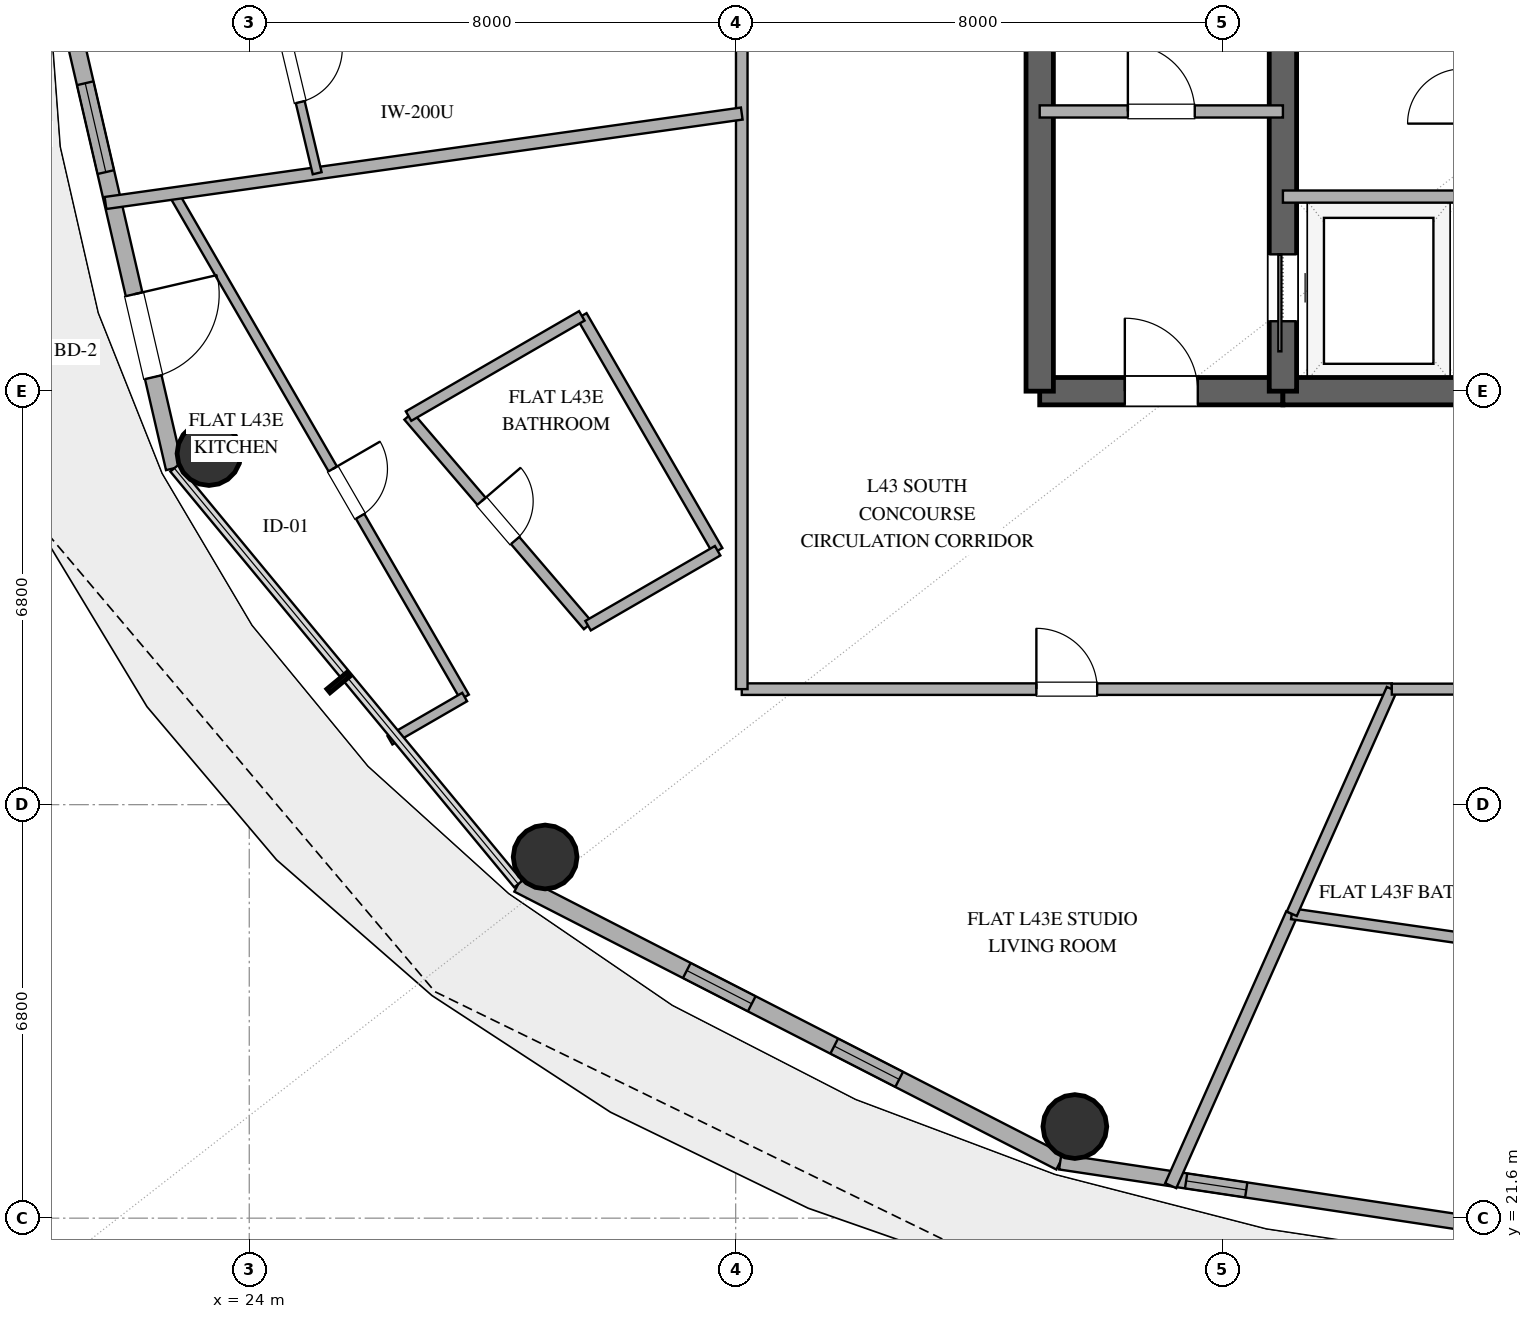
"""IFC4 building model, lengths in metres.
Left out: names, types, materials, properties, quantities, classifications, styles, units other than length and angle.
Written with IfcOpenShell. Run it as: python <this file> out.ifc"""

import sys

from ifc_helpers import new_model, si_unit, direction, frame, frame_2d, origin, origin_2d, place, context, subcontext, project, spatial, rectangle, hollow_circle, extrude, element, fill, save


model = new_model("IFC4")
c1 = context("Model", 3, precision=1e-05, world=origin(), true_north=direction((0.0, 1.0)))
c2 = subcontext(c1, "Body", "Model", "MODEL_VIEW")
j1 = project(units=[si_unit("LENGTHUNIT", "METRE"), si_unit("PLANEANGLEUNIT", "RADIAN")], contexts=[c1])
p1 = place(None, origin())
s1 = spatial("IfcSite", under=j1, at=p1, CompositionType="ELEMENT")
p2 = place(p1, origin())
s2 = spatial("IfcBuilding", under=s1, at=p2, CompositionType="ELEMENT")
p3 = place(p2, frame((0.0, 0.0, 172.2)))
s3 = spatial("IfcBuildingStorey", under=s2, at=p3, CompositionType="ELEMENT", Elevation=172.2)
p4 = place(p3, frame((37.0, 35.2, 0.0), z_axis=(0.0, 0.0, 1.0), x_axis=(1.0, 0.0, 0.0)))
e1 = element("IfcWall", 1, at=p4, inside=s3, PredefinedType="SHEAR", context=c2, shape_type="SweptSolid", body=[
    extrude(rectangle(XDim=4.0, YDim=0.45, at=frame_2d((2.0, 0.0))), origin(), (0.0, 0.0, 1.0), 3.38),
])
p5 = place(p4, frame((1.4, 0.0, 0.0)))
e2 = element("IfcOpeningElement", 2, at=p5, cuts=e1, PredefinedType="OPENING", context=c2, shape_type="SweptSolid", body=[
    extrude(rectangle(XDim=1.2, YDim=2.15, at=frame_2d((0.6, 1.075))), frame((0.0, 0.235, 0.0), z_axis=(0.0, -1.0, 0.0), x_axis=(1.0, 0.0, 0.0)), (0.0, 0.0, 1.0), 0.47),
])
p6 = place(p3, frame((41.0, 35.2, 0.0), z_axis=(0.0, 0.0, 1.0), x_axis=(1.0, 0.0, 0.0)))
e3 = element("IfcWall", 3, at=p6, inside=s3, PredefinedType="SHEAR", context=c2, shape_type="SweptSolid", body=[
    extrude(rectangle(XDim=14.0, YDim=0.45, at=frame_2d((7.0, 0.0))), origin(), (0.0, 0.0, 1.0), 3.38),
])
p7 = place(p6, frame((6.1, 0.0, 0.0)))
e4 = element("IfcOpeningElement", 4, at=p7, cuts=e3, PredefinedType="OPENING", context=c2, shape_type="SweptSolid", body=[
    extrude(rectangle(XDim=1.8, YDim=2.25, at=frame_2d((0.9, 1.125))), frame((0.0, 0.235, 0.0), z_axis=(0.0, -1.0, 0.0), x_axis=(1.0, 0.0, 0.0)), (0.0, 0.0, 1.0), 0.47),
])
p8 = place(p3, frame((37.0, 35.2, 0.0), z_axis=(0.0, 0.0, 1.0), x_axis=(0.0, 1.0, 0.0)))
e5 = element("IfcWall", 5, at=p8, inside=s3, PredefinedType="SHEAR", context=c2, shape_type="SweptSolid", body=[
    extrude(rectangle(XDim=13.6, YDim=0.45, at=frame_2d((6.8, 0.0))), origin(), (0.0, 0.0, 1.0), 3.38),
])
p9 = place(p3, frame((41.0, 35.2, 0.0), z_axis=(0.0, 0.0, 1.0), x_axis=(0.0, 1.0, 0.0)))
e6 = element("IfcWall", 6, at=p9, inside=s3, PredefinedType="SHEAR", context=c2, shape_type="SweptSolid", body=[
    extrude(rectangle(XDim=13.6, YDim=0.45, at=frame_2d((6.8, 0.0))), origin(), (0.0, 0.0, 1.0), 3.38),
])
p10 = place(p9, frame((1.15, 0.0, 0.0)))
e7 = element("IfcOpeningElement", 7, at=p10, cuts=e6, PredefinedType="OPENING", context=c2, shape_type="SweptSolid", body=[
    extrude(rectangle(XDim=1.1, YDim=2.2, at=frame_2d((0.55, 1.1))), frame((0.0, 0.235, 0.0), z_axis=(0.0, -1.0, 0.0), x_axis=(1.0, 0.0, 0.0)), (0.0, 0.0, 1.0), 0.47),
])
for number, where, z_axis, x_axis in (
    (8, (23.338, 34.174, 0.0), (0.0, 0.0, 1.0), (1.0, 0.0, 0.0)),
    (9, (28.866, 27.54, 0.0), (0.0, 0.0, 1.0), (1.0, 0.0, 0.0)),
    (10, (37.578, 23.107, 0.0), (0.0, 0.0, 1.0), (1.0, 0.0, 0.0)),
):
    element("IfcColumn", number, at=place(p3, frame(where, z_axis=z_axis, x_axis=x_axis)), inside=s3, PredefinedType="COLUMN", context=c2, shape_type="SweptSolid", body=[
        extrude(hollow_circle(Radius=0.525, WallThickness=0.028, at=origin_2d()), origin(), (0.0, 0.0, 1.0), 3.38),
    ])
p11 = place(p3, frame((20.901, 42.0, 0.0), z_axis=(0.0, 0.0, 1.0), x_axis=(0.225473184558, -0.974249374157, 0.0)))
e11 = element("IfcWall", 11, at=p11, inside=s3, PredefinedType="SOLIDWALL", context=c2, shape_type="SweptSolid", body=[
    extrude(rectangle(XDim=8.28, YDim=0.28, at=frame_2d((4.14, 0.0))), origin(), (0.0, 0.0, 1.0), 3.38),
])
p12 = place(p11, frame((1.782, 0.0, 0.85)))
e12 = element("IfcOpeningElement", 12, at=p12, cuts=e11, PredefinedType="OPENING", context=c2, shape_type="SweptSolid", body=[
    extrude(rectangle(XDim=1.5, YDim=1.8, at=frame_2d((0.75, 0.9))), frame((0.0, 0.15, 0.0), z_axis=(0.0, -1.0, 0.0), x_axis=(1.0, 0.0, 0.0)), (0.0, 0.0, 1.0), 0.3),
])
p13 = place(p11, frame((5.344, 0.0, 0.0)))
e13 = element("IfcOpeningElement", 13, at=p13, cuts=e11, PredefinedType="OPENING", context=c2, shape_type="SweptSolid", body=[
    extrude(rectangle(XDim=1.4, YDim=2.2, at=frame_2d((0.7, 1.1))), frame((0.0, 0.15, 0.0), z_axis=(0.0, -1.0, 0.0), x_axis=(1.0, 0.0, 0.0)), (0.0, 0.0, 1.0), 0.3),
])
p14 = place(p3, frame((28.424, 27.094, 0.0), z_axis=(0.0, 0.0, 1.0), x_axis=(0.889872523182, -0.456209263919, 0.0)))
e14 = element("IfcWall", 14, at=p14, inside=s3, PredefinedType="SOLIDWALL", context=c2, shape_type="SweptSolid", body=[
    extrude(rectangle(XDim=10.016, YDim=0.28, at=frame_2d((5.008, 0.0))), origin(), (0.0, 0.0, 1.0), 3.38),
])
p15 = place(p14, frame((3.115, 0.0, 0.85)))
e15 = element("IfcOpeningElement", 15, at=p15, cuts=e14, PredefinedType="OPENING", context=c2, shape_type="SweptSolid", body=[
    extrude(rectangle(XDim=1.2, YDim=1.8, at=frame_2d((0.6, 0.9))), frame((0.0, 0.15, 0.0), z_axis=(0.0, -1.0, 0.0), x_axis=(1.0, 0.0, 0.0)), (0.0, 0.0, 1.0), 0.3),
])
p16 = place(p14, frame((5.84, 0.0, 0.85)))
e16 = element("IfcOpeningElement", 16, at=p16, cuts=e14, PredefinedType="OPENING", context=c2, shape_type="SweptSolid", body=[
    extrude(rectangle(XDim=1.2, YDim=1.8, at=frame_2d((0.6, 0.9))), frame((0.0, 0.15, 0.0), z_axis=(0.0, -1.0, 0.0), x_axis=(1.0, 0.0, 0.0)), (0.0, 0.0, 1.0), 0.3),
])
p17 = place(p3, frame((37.337, 22.525, 0.0), z_axis=(0.0, 0.0, 1.0), x_axis=(0.988863993413, -0.148822049884, 0.0)))
e17 = element("IfcWall", 17, at=p17, inside=s3, PredefinedType="SOLIDWALL", context=c2, shape_type="SweptSolid", body=[
    extrude(rectangle(XDim=10.783, YDim=0.25, at=frame_2d((5.392, 0.0))), origin(), (0.0, 0.0, 1.0), 3.38),
])
p18 = place(p17, frame((2.094, 0.0, 0.35)))
e18 = element("IfcOpeningElement", 18, at=p18, cuts=e17, PredefinedType="OPENING", context=c2, shape_type="SweptSolid", body=[
    extrude(rectangle(XDim=1.0, YDim=1.05, at=frame_2d((0.5, 0.525))), frame((0.0, 0.135, 0.0), z_axis=(0.0, -1.0, 0.0), x_axis=(1.0, 0.0, 0.0)), (0.0, 0.0, 1.0), 0.27),
])
p19 = place(p3, frame((37.0, 39.8, 0.0), z_axis=(0.0, 0.0, 1.0), x_axis=(1.0, 0.0, 0.0)))
e19 = element("IfcWall", 19, at=p19, inside=s3, PredefinedType="SOLIDWALL", context=c2, shape_type="SweptSolid", body=[
    extrude(rectangle(XDim=4.0, YDim=0.2, at=frame_2d((2.0, 0.0))), origin(), (0.0, 0.0, 1.0), 2.74),
])
p20 = place(p19, frame((1.45, 0.0, 0.0)))
e20 = element("IfcOpeningElement", 20, at=p20, cuts=e19, PredefinedType="OPENING", context=c2, shape_type="SweptSolid", body=[
    extrude(rectangle(XDim=1.1, YDim=2.15, at=frame_2d((0.55, 1.075))), frame((0.0, 0.11, 0.0), z_axis=(0.0, -1.0, 0.0), x_axis=(1.0, 0.0, 0.0)), (0.0, 0.0, 1.0), 0.22),
])
p21 = place(p3, frame((41.0, 38.4, 0.0), z_axis=(0.0, 0.0, 1.0), x_axis=(1.0, 0.0, 0.0)))
e21 = element("IfcWall", 21, at=p21, inside=s3, PredefinedType="SOLIDWALL", context=c2, shape_type="SweptSolid", body=[
    extrude(rectangle(XDim=2.95, YDim=0.2, at=frame_2d((1.475, 0.0))), origin(), (0.0, 0.0, 1.0), 2.74),
])
p22 = place(p3, frame((32.1, 30.3, 0.0), z_axis=(0.0, 0.0, 1.0), x_axis=(1.0, 0.0, 0.0)))
e22 = element("IfcWall", 22, at=p22, inside=s3, PredefinedType="PARTITIONING", context=c2, shape_type="SweptSolid", body=[
    extrude(rectangle(XDim=10.691, YDim=0.19, at=frame_2d((5.345, 0.0))), origin(), (0.0, 0.0, 1.0), 2.74),
])
p23 = place(p22, frame((4.845, 0.0, 0.0)))
e23 = element("IfcOpeningElement", 23, at=p23, cuts=e22, PredefinedType="OPENING", context=c2, shape_type="SweptSolid", body=[
    extrude(rectangle(XDim=1.0, YDim=2.2, at=frame_2d((0.5, 1.1))), frame((0.0, 0.105, 0.0), z_axis=(0.0, -1.0, 0.0), x_axis=(1.0, 0.0, 0.0)), (0.0, 0.0, 1.0), 0.21),
])
p24 = place(p3, frame((22.753, 38.452, 0.0), z_axis=(0.0, 0.0, 1.0), x_axis=(0.500584533727, -0.865687659952, 0.0)))
e24 = element("IfcWall", 24, at=p24, inside=s3, PredefinedType="PLUMBINGWALL", context=c2, shape_type="SweptSolid", body=[
    extrude(rectangle(XDim=9.567, YDim=0.16, at=frame_2d((4.783, 0.0))), origin(), (0.0, 0.0, 1.0), 2.74),
])
p25 = place(p24, frame((5.233, 0.0, 0.0)))
e25 = element("IfcOpeningElement", 25, at=p25, cuts=e24, PredefinedType="OPENING", context=c2, shape_type="SweptSolid", body=[
    extrude(rectangle(XDim=0.9, YDim=2.1, at=frame_2d((0.45, 1.05))), frame((0.0, 0.09, 0.0), z_axis=(0.0, -1.0, 0.0), x_axis=(1.0, 0.0, 0.0)), (0.0, 0.0, 1.0), 0.18),
])
p26 = place(p3, frame((32.1, 46.593, 0.0), z_axis=(0.0, 0.0, 1.0), x_axis=(0.0, -1.0, 0.0)))
e26 = element("IfcWall", 26, at=p26, inside=s3, PredefinedType="PARTITIONING", context=c2, shape_type="SweptSolid", body=[
    extrude(rectangle(XDim=16.292, YDim=0.19, at=frame_2d((8.146, 0.0))), origin(), (0.0, 0.0, 1.0), 2.74),
])
p27 = place(p3, frame((21.635, 38.295, 0.0), z_axis=(0.0, 0.0, 1.0), x_axis=(0.990268074466, 0.139173060229, 0.0)))
e27 = element("IfcWall", 27, at=p27, inside=s3, PredefinedType="PARTITIONING", context=c2, shape_type="SweptSolid", body=[
    extrude(rectangle(XDim=10.567, YDim=0.2, at=frame_2d((5.284, 0.0))), origin(), (0.0, 0.0, 1.0), 2.74),
])
p28 = place(p3, frame((39.155, 22.134, 0.0), z_axis=(0.0, 0.0, 1.0), x_axis=(0.406740050792, 0.913543940422, 0.0)))
e28 = element("IfcWall", 28, at=p28, inside=s3, PredefinedType="PARTITIONING", context=c2, shape_type="SweptSolid", body=[
    extrude(rectangle(XDim=4.894, YDim=0.2, at=frame_2d((2.447, 0.0))), origin(), (0.0, 0.0, 1.0), 2.74),
])
p29 = place(p3, frame((26.62, 34.79, 0.0), z_axis=(0.0, 0.0, 1.0), x_axis=(0.650507788654, -0.759499583213, 0.0)))
e29 = element("IfcWall", 29, at=p29, inside=s3, PredefinedType="PLUMBINGWALL", context=c2, shape_type="SweptSolid", body=[
    extrude(rectangle(XDim=4.538, YDim=0.18, at=frame_2d((2.269, 0.0))), origin(), (0.0, 0.0, 1.0), 2.74),
])
p30 = place(p29, frame((1.844, 0.0, 0.0)))
e30 = element("IfcOpeningElement", 30, at=p30, cuts=e29, PredefinedType="OPENING", context=c2, shape_type="SweptSolid", body=[
    extrude(rectangle(XDim=0.85, YDim=2.1, at=frame_2d((0.425, 1.05))), frame((0.0, 0.1, 0.0), z_axis=(0.0, -1.0, 0.0), x_axis=(1.0, 0.0, 0.0)), (0.0, 0.0, 1.0), 0.2),
])
p31 = place(p3, frame((31.703, 32.576, 0.0), z_axis=(0.0, 0.0, 1.0), x_axis=(-0.500604830324, 0.865675923112, 0.0)))
e31 = element("IfcWall", 31, at=p31, inside=s3, PredefinedType="PLUMBINGWALL", context=c2, shape_type="SweptSolid", body=[
    extrude(rectangle(XDim=4.462, YDim=0.18, at=frame_2d((2.231, 0.0))), origin(), (0.0, 0.0, 1.0), 2.74),
])
p32 = place(p3, frame((45.366, 25.999, 0.0), z_axis=(0.0, 0.0, 1.0), x_axis=(-0.98982427769, 0.14229511339, 0.0)))
e32 = element("IfcWall", 32, at=p32, inside=s3, PredefinedType="PLUMBINGWALL", context=c2, shape_type="SweptSolid", body=[
    extrude(rectangle(XDim=4.264, YDim=0.18, at=frame_2d((2.132, 0.0))), origin(), (0.0, 0.0, 1.0), 2.74),
])
p33 = place(p3, frame((41.146, 26.605, 0.0), z_axis=(0.0, 0.0, 1.0), x_axis=(0.406732062562, 0.913547497005, 0.0)))
e33 = element("IfcWall", 33, at=p33, inside=s3, PredefinedType="PLUMBINGWALL", context=c2, shape_type="SweptSolid", body=[
    extrude(rectangle(XDim=4.044, YDim=0.18, at=frame_2d((2.022, 0.0))), origin(), (0.0, 0.0, 1.0), 2.74),
])
p34 = place(p3, frame((24.351, 42.0, 0.0), z_axis=(0.0, 0.0, 1.0), x_axis=(0.231590575549, -0.972813345569, 0.0)))
e34 = element("IfcWall", 34, at=p34, inside=s3, PredefinedType="PARTITIONING", context=c2, shape_type="SweptSolid", body=[
    extrude(rectangle(XDim=3.306, YDim=0.15, at=frame_2d((1.653, 0.0))), origin(), (0.0, 0.0, 1.0), 2.74),
])
p35 = place(p34, frame((1.203, 0.0, 0.0)))
e35 = element("IfcOpeningElement", 35, at=p35, cuts=e34, PredefinedType="OPENING", context=c2, shape_type="SweptSolid", body=[
    extrude(rectangle(XDim=0.9, YDim=2.1, at=frame_2d((0.45, 1.05))), frame((0.0, 0.085, 0.0), z_axis=(0.0, -1.0, 0.0), x_axis=(1.0, 0.0, 0.0)), (0.0, 0.0, 1.0), 0.17),
])
p36 = place(p3, frame((29.469, 36.438, 0.0), z_axis=(0.0, 0.0, 1.0), x_axis=(-0.86566653326, -0.500621067469, 0.0)))
e36 = element("IfcWall", 36, at=p36, inside=s3, PredefinedType="PLUMBINGWALL", context=c2, shape_type="SweptSolid", body=[
    extrude(rectangle(XDim=3.292, YDim=0.18, at=frame_2d((1.646, 0.0))), origin(), (0.0, 0.0, 1.0), 2.74),
])
p37 = place(p3, frame((29.572, 31.344, 0.0), z_axis=(0.0, 0.0, 1.0), x_axis=(0.865711329059, 0.500543599239, 0.0)))
e37 = element("IfcWall", 37, at=p37, inside=s3, PredefinedType="PLUMBINGWALL", context=c2, shape_type="SweptSolid", body=[
    extrude(rectangle(XDim=2.462, YDim=0.18, at=frame_2d((1.231, 0.0))), origin(), (0.0, 0.0, 1.0), 2.74),
])
p38 = place(p3, frame((42.791, 30.3, 0.0), z_axis=(0.0, 0.0, 1.0), x_axis=(1.0, 0.0, 0.0)))
e38 = element("IfcWall", 38, at=p38, inside=s3, PredefinedType="PLUMBINGWALL", context=c2, shape_type="SweptSolid", body=[
    extrude(rectangle(XDim=2.082, YDim=0.18, at=frame_2d((1.041, 0.0))), origin(), (0.0, 0.0, 1.0), 2.74),
])
p39 = place(p3, frame((27.542, 30.17, 0.0), z_axis=(0.0, 0.0, 1.0), x_axis=(-0.865626475351, -0.500690328617, 0.0)))
e39 = element("IfcWall", 39, at=p39, inside=s3, PredefinedType="PLUMBINGWALL", context=c2, shape_type="SweptSolid", body=[
    extrude(rectangle(XDim=1.419, YDim=0.16, at=frame_2d((0.709, 0.0))), origin(), (0.0, 0.0, 1.0), 2.74),
])
p40 = place(p12, origin())
e40 = element("IfcWindow", 40, at=p40, inside=s3, PartitioningType="SINGLE_PANEL", PredefinedType="WINDOW", context=c2, shape_type="SweptSolid", body=[
    extrude(rectangle(XDim=1.5, YDim=1.8, at=frame_2d((0.75, 0.9))), frame((0.0, 0.03, 0.0), z_axis=(0.0, -1.0, 0.0), x_axis=(1.0, 0.0, 0.0)), (0.0, 0.0, 1.0), 0.06),
])
fill(e12, e40)
p41 = place(p13, origin())
e41 = element("IfcDoor", 41, at=p41, inside=s3, OperationType="SINGLE_SWING_LEFT", PredefinedType="DOOR", context=c2, shape_type="SweptSolid", body=[
    extrude(rectangle(XDim=1.4, YDim=2.2, at=frame_2d((0.7, 1.1))), frame((0.0, 0.025, 0.0), z_axis=(0.0, -1.0, 0.0), x_axis=(1.0, 0.0, 0.0)), (0.0, 0.0, 1.0), 0.05),
])
fill(e13, e41)
p42 = place(p15, origin())
e42 = element("IfcWindow", 42, at=p42, inside=s3, PartitioningType="SINGLE_PANEL", PredefinedType="WINDOW", context=c2, shape_type="SweptSolid", body=[
    extrude(rectangle(XDim=1.2, YDim=1.8, at=frame_2d((0.6, 0.9))), frame((0.0, 0.03, 0.0), z_axis=(0.0, -1.0, 0.0), x_axis=(1.0, 0.0, 0.0)), (0.0, 0.0, 1.0), 0.06),
])
fill(e15, e42)
p43 = place(p16, origin())
e43 = element("IfcWindow", 43, at=p43, inside=s3, PartitioningType="SINGLE_PANEL", PredefinedType="WINDOW", context=c2, shape_type="SweptSolid", body=[
    extrude(rectangle(XDim=1.2, YDim=1.8, at=frame_2d((0.6, 0.9))), frame((0.0, 0.03, 0.0), z_axis=(0.0, -1.0, 0.0), x_axis=(1.0, 0.0, 0.0)), (0.0, 0.0, 1.0), 0.06),
])
fill(e16, e43)
p44 = place(p18, origin())
e44 = element("IfcWindow", 44, at=p44, inside=s3, PartitioningType="SINGLE_PANEL", PredefinedType="WINDOW", context=c2, shape_type="SweptSolid", body=[
    extrude(rectangle(XDim=1.0, YDim=1.05, at=frame_2d((0.5, 0.525))), frame((0.0, 0.03, 0.0), z_axis=(0.0, -1.0, 0.0), x_axis=(1.0, 0.0, 0.0)), (0.0, 0.0, 1.0), 0.06),
])
fill(e18, e44)
p45 = place(p10, origin())
e45 = element("IfcDoor", 45, at=p45, inside=s3, OperationType="SLIDING_TO_LEFT", PredefinedType="DOOR", context=c2, shape_type="SweptSolid", body=[
    extrude(rectangle(XDim=1.1, YDim=2.2, at=frame_2d((0.55, 1.1))), frame((0.0, 0.025, 0.0), z_axis=(0.0, -1.0, 0.0), x_axis=(1.0, 0.0, 0.0)), (0.0, 0.0, 1.0), 0.05),
])
fill(e7, e45)
p46 = place(p5, origin())
e46 = element("IfcDoor", 46, at=p46, inside=s3, OperationType="SINGLE_SWING_LEFT", PredefinedType="DOOR", context=c2, shape_type="SweptSolid", body=[
    extrude(rectangle(XDim=1.2, YDim=2.15, at=frame_2d((0.6, 1.075))), frame((0.0, 0.025, 0.0), z_axis=(0.0, -1.0, 0.0), x_axis=(1.0, 0.0, 0.0)), (0.0, 0.0, 1.0), 0.05),
])
fill(e2, e46)
p47 = place(p20, origin())
e47 = element("IfcDoor", 47, at=p47, inside=s3, OperationType="SINGLE_SWING_LEFT", PredefinedType="DOOR", context=c2, shape_type="SweptSolid", body=[
    extrude(rectangle(XDim=1.1, YDim=2.15, at=frame_2d((0.55, 1.075))), frame((0.0, 0.025, 0.0), z_axis=(0.0, -1.0, 0.0), x_axis=(1.0, 0.0, 0.0)), (0.0, 0.0, 1.0), 0.05),
])
fill(e20, e47)
p48 = place(p23, origin())
e48 = element("IfcDoor", 48, at=p48, inside=s3, OperationType="SINGLE_SWING_LEFT", PredefinedType="DOOR", context=c2, shape_type="SweptSolid", body=[
    extrude(rectangle(XDim=1.0, YDim=2.2, at=frame_2d((0.5, 1.1))), frame((0.0, 0.025, 0.0), z_axis=(0.0, -1.0, 0.0), x_axis=(1.0, 0.0, 0.0)), (0.0, 0.0, 1.0), 0.05),
])
fill(e23, e48)
p49 = place(p25, origin())
e49 = element("IfcDoor", 49, at=p49, inside=s3, OperationType="SINGLE_SWING_LEFT", PredefinedType="DOOR", context=c2, shape_type="SweptSolid", body=[
    extrude(rectangle(XDim=0.9, YDim=2.1, at=frame_2d((0.45, 1.05))), frame((0.0, 0.025, 0.0), z_axis=(0.0, -1.0, 0.0), x_axis=(1.0, 0.0, 0.0)), (0.0, 0.0, 1.0), 0.05),
])
fill(e25, e49)
p50 = place(p30, origin())
e50 = element("IfcDoor", 50, at=p50, inside=s3, OperationType="SINGLE_SWING_LEFT", PredefinedType="DOOR", context=c2, shape_type="SweptSolid", body=[
    extrude(rectangle(XDim=0.85, YDim=2.1, at=frame_2d((0.425, 1.05))), frame((0.0, 0.025, 0.0), z_axis=(0.0, -1.0, 0.0), x_axis=(1.0, 0.0, 0.0)), (0.0, 0.0, 1.0), 0.05),
])
fill(e30, e50)
p51 = place(p35, origin())
e51 = element("IfcDoor", 51, at=p51, inside=s3, OperationType="SINGLE_SWING_LEFT", PredefinedType="DOOR", context=c2, shape_type="SweptSolid", body=[
    extrude(rectangle(XDim=0.9, YDim=2.1, at=frame_2d((0.45, 1.05))), frame((0.0, 0.025, 0.0), z_axis=(0.0, -1.0, 0.0), x_axis=(1.0, 0.0, 0.0)), (0.0, 0.0, 1.0), 0.05),
])
fill(e35, e51)
save(model, sys.argv[1])
